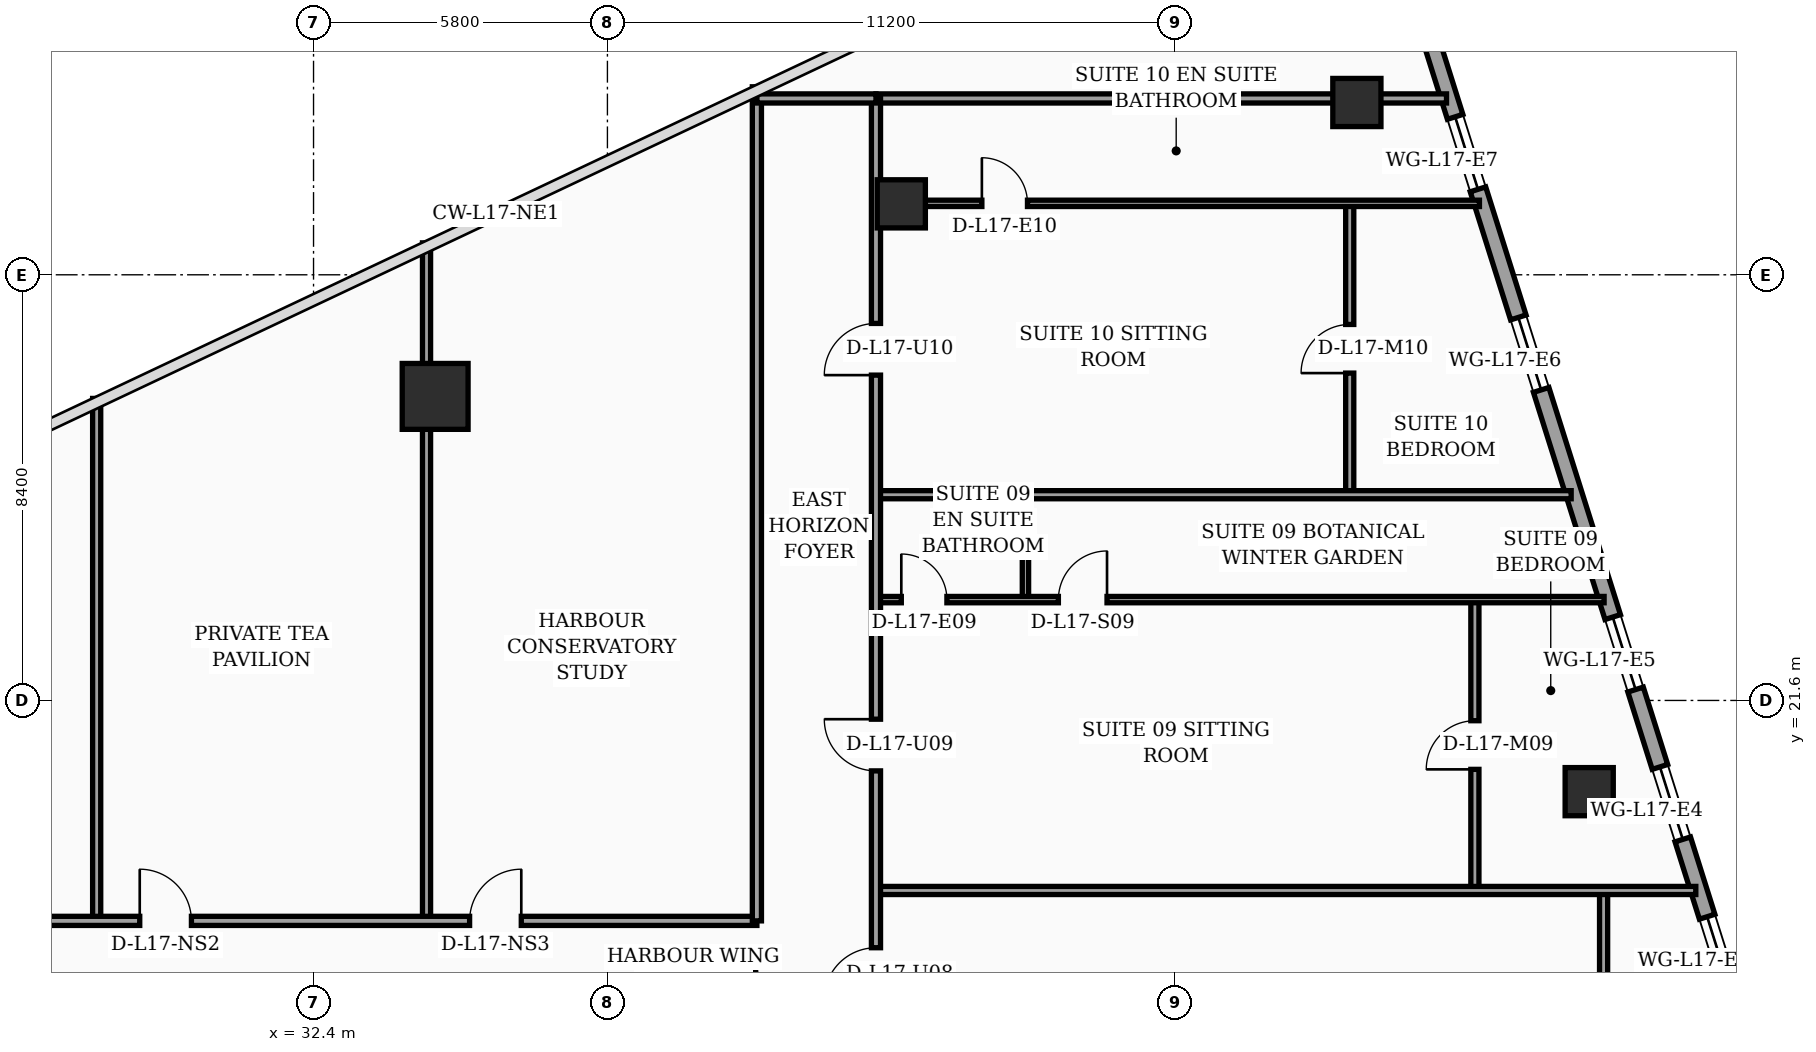
"""IFC4 building model, lengths in metres.
Left out: names, types, materials, properties, quantities, classifications, styles, units other than length and angle.
Written with IfcOpenShell. Run it as: python <this file> out.ifc"""

import sys

from ifc_helpers import new_model, si_unit, direction, frame, frame_2d, origin, origin_2d, place, context, subcontext, project, spatial, rectangle, hollow_rectangle, circle, extrude, element, fill, save


model = new_model("IFC4")
c1 = context("Model", 3, precision=1e-05, world=origin(), true_north=direction((0.0, 1.0)))
c2 = subcontext(c1, "Body", "Model", "MODEL_VIEW")
j1 = project(units=[si_unit("LENGTHUNIT", "METRE"), si_unit("PLANEANGLEUNIT", "RADIAN")], contexts=[c1])
p1 = place(None, origin())
s1 = spatial("IfcSite", under=j1, at=p1, CompositionType="ELEMENT")
p2 = place(p1, origin())
s2 = spatial("IfcBuilding", under=s1, at=p2, CompositionType="ELEMENT")
p3 = place(p2, frame((0.0, 0.0, 73.6)))
s3 = spatial("IfcBuildingStorey", under=s2, at=p3, CompositionType="ELEMENT", Elevation=73.6)
p4 = place(p3, frame((34.8, 27.6, 0.0), z_axis=(0.0, 0.0, 1.0), x_axis=(1.0, 0.0, 0.0)))
e1 = element("IfcColumn", 1, at=p4, inside=s3, PredefinedType="COLUMN", context=c2, shape_type="SweptSolid", body=[
    extrude(circle(Radius=0.65, at=origin_2d()), origin(), (0.0, 0.0, 1.0), 3.56),
])
for number, where, z_axis, x_axis in (
    (2, (44.0, 31.4, 0.0), (0.0, 0.0, 1.0), (1.0, 0.0, 0.0)),
    (3, (57.576, 19.8, 0.0), (0.0, 0.0, 1.0), (1.0, 0.0, 0.0)),
    (4, (52.991, 33.4, 0.0), (0.0, 0.0, 1.0), (1.0, 0.0, 0.0)),
):
    element("IfcColumn", number, at=place(p3, frame(where, z_axis=z_axis, x_axis=x_axis)), inside=s3, PredefinedType="COLUMN", context=c2, shape_type="SweptSolid", body=[
        extrude(hollow_rectangle(XDim=0.95, YDim=0.95, WallThickness=0.04, at=origin_2d()), origin(), (0.0, 0.0, 1.0), 3.56),
    ])
p5 = place(p3, frame((63.63, 5.505, 0.0), z_axis=(0.0, 0.0, 1.0), x_axis=(-0.300501856448, 0.953781229775, 0.0)))
e5 = element("IfcWall", 5, at=p5, inside=s3, PredefinedType="SOLIDWALL", context=c2, shape_type="SweptSolid", body=[
    extrude(rectangle(XDim=30.814, YDim=0.32, at=frame_2d((15.407, 0.0))), origin(), (0.0, 0.0, 1.0), 3.56),
])
p6 = place(p5, frame((4.747, 0.0, 0.0)))
e6 = element("IfcOpeningElement", 6, at=p6, cuts=e5, PredefinedType="OPENING", context=c2, shape_type="SweptSolid", body=[
    extrude(rectangle(XDim=1.4, YDim=2.25, at=frame_2d((0.7, 1.125))), frame((0.0, 0.17, 0.0), z_axis=(0.0, -1.0, 0.0), x_axis=(1.0, 0.0, 0.0)), (0.0, 0.0, 1.0), 0.34),
])
p7 = place(p5, frame((2.65, 0.0, 0.75)))
e7 = element("IfcOpeningElement", 7, at=p7, cuts=e5, PredefinedType="OPENING", context=c2, shape_type="SweptSolid", body=[
    extrude(rectangle(XDim=1.5, YDim=1.6, at=frame_2d((0.75, 0.8))), frame((0.0, 0.17, 0.0), z_axis=(0.0, -1.0, 0.0), x_axis=(1.0, 0.0, 0.0)), (0.0, 0.0, 1.0), 0.34),
])
p8 = place(p5, frame((7.8, 0.0, 0.75)))
e8 = element("IfcOpeningElement", 8, at=p8, cuts=e5, PredefinedType="OPENING", context=c2, shape_type="SweptSolid", body=[
    extrude(rectangle(XDim=1.5, YDim=1.6, at=frame_2d((0.75, 0.8))), frame((0.0, 0.17, 0.0), z_axis=(0.0, -1.0, 0.0), x_axis=(1.0, 0.0, 0.0)), (0.0, 0.0, 1.0), 0.34),
])
p9 = place(p5, frame((10.9, 0.0, 0.75)))
e9 = element("IfcOpeningElement", 9, at=p9, cuts=e5, PredefinedType="OPENING", context=c2, shape_type="SweptSolid", body=[
    extrude(rectangle(XDim=1.5, YDim=1.6, at=frame_2d((0.75, 0.8))), frame((0.0, 0.17, 0.0), z_axis=(0.0, -1.0, 0.0), x_axis=(1.0, 0.0, 0.0)), (0.0, 0.0, 1.0), 0.34),
])
p10 = place(p5, frame((14.0, 0.0, 0.75)))
e10 = element("IfcOpeningElement", 10, at=p10, cuts=e5, PredefinedType="OPENING", context=c2, shape_type="SweptSolid", body=[
    extrude(rectangle(XDim=1.5, YDim=1.6, at=frame_2d((0.75, 0.8))), frame((0.0, 0.17, 0.0), z_axis=(0.0, -1.0, 0.0), x_axis=(1.0, 0.0, 0.0)), (0.0, 0.0, 1.0), 0.34),
])
p11 = place(p5, frame((17.1, 0.0, 0.75)))
e11 = element("IfcOpeningElement", 11, at=p11, cuts=e5, PredefinedType="OPENING", context=c2, shape_type="SweptSolid", body=[
    extrude(rectangle(XDim=1.5, YDim=1.6, at=frame_2d((0.75, 0.8))), frame((0.0, 0.17, 0.0), z_axis=(0.0, -1.0, 0.0), x_axis=(1.0, 0.0, 0.0)), (0.0, 0.0, 1.0), 0.34),
])
p12 = place(p5, frame((23.3, 0.0, 0.75)))
e12 = element("IfcOpeningElement", 12, at=p12, cuts=e5, PredefinedType="OPENING", context=c2, shape_type="SweptSolid", body=[
    extrude(rectangle(XDim=1.5, YDim=1.6, at=frame_2d((0.75, 0.8))), frame((0.0, 0.17, 0.0), z_axis=(0.0, -1.0, 0.0), x_axis=(1.0, 0.0, 0.0)), (0.0, 0.0, 1.0), 0.34),
])
p13 = place(p5, frame((27.45, 0.0, 0.75)))
e13 = element("IfcOpeningElement", 13, at=p13, cuts=e5, PredefinedType="OPENING", context=c2, shape_type="SweptSolid", body=[
    extrude(rectangle(XDim=1.5, YDim=1.6, at=frame_2d((0.75, 0.8))), frame((0.0, 0.17, 0.0), z_axis=(0.0, -1.0, 0.0), x_axis=(1.0, 0.0, 0.0)), (0.0, 0.0, 1.0), 0.34),
])
p14 = place(p3, frame((28.12, 17.25, 0.0), z_axis=(0.0, 0.0, 1.0), x_axis=(0.0, 1.0, 0.0)))
e14 = element("IfcWall", 14, at=p14, inside=s3, PredefinedType="PARTITIONING", context=c2, shape_type="SweptSolid", body=[
    extrude(rectangle(XDim=10.31, YDim=0.16, at=frame_2d((5.155, 0.0))), origin(), (0.0, 0.0, 1.0), 2.84),
])
p15 = place(p3, frame((34.63, 17.25, 0.0), z_axis=(0.0, 0.0, 1.0), x_axis=(0.0, 1.0, 0.0)))
e15 = element("IfcWall", 15, at=p15, inside=s3, PredefinedType="PARTITIONING", context=c2, shape_type="SweptSolid", body=[
    extrude(rectangle(XDim=13.38, YDim=0.16, at=frame_2d((6.69, 0.0))), origin(), (0.0, 0.0, 1.0), 2.84),
])
p16 = place(p3, frame((21.5, 17.25, 0.0), z_axis=(0.0, 0.0, 1.0), x_axis=(1.0, 0.0, 0.0)))
e16 = element("IfcWall", 16, at=p16, inside=s3, PredefinedType="PARTITIONING", context=c2, shape_type="SweptSolid", body=[
    extrude(rectangle(XDim=19.65, YDim=0.18, at=frame_2d((9.825, 0.0))), origin(), (0.0, 0.0, 1.0), 2.84),
])
p17 = place(p16, frame((0.95, 0.0, 0.0)))
e17 = element("IfcOpeningElement", 17, at=p17, cuts=e16, PredefinedType="OPENING", context=c2, shape_type="SweptSolid", body=[
    extrude(rectangle(XDim=1.02, YDim=2.2, at=frame_2d((0.51, 1.1))), frame((0.0, 0.1, 0.0), z_axis=(0.0, -1.0, 0.0), x_axis=(1.0, 0.0, 0.0)), (0.0, 0.0, 1.0), 0.2),
])
p18 = place(p16, frame((7.47, 0.0, 0.0)))
e18 = element("IfcOpeningElement", 18, at=p18, cuts=e16, PredefinedType="OPENING", context=c2, shape_type="SweptSolid", body=[
    extrude(rectangle(XDim=1.02, YDim=2.2, at=frame_2d((0.51, 1.1))), frame((0.0, 0.1, 0.0), z_axis=(0.0, -1.0, 0.0), x_axis=(1.0, 0.0, 0.0)), (0.0, 0.0, 1.0), 0.2),
])
p19 = place(p16, frame((13.98, 0.0, 0.0)))
e19 = element("IfcOpeningElement", 19, at=p19, cuts=e16, PredefinedType="OPENING", context=c2, shape_type="SweptSolid", body=[
    extrude(rectangle(XDim=1.02, YDim=2.2, at=frame_2d((0.51, 1.1))), frame((0.0, 0.1, 0.0), z_axis=(0.0, -1.0, 0.0), x_axis=(1.0, 0.0, 0.0)), (0.0, 0.0, 1.0), 0.2),
])
p20 = place(p3, frame((41.15, 17.25, 0.0), z_axis=(0.0, 0.0, 1.0), x_axis=(0.0, 1.0, 0.0)))
e20 = element("IfcWall", 20, at=p20, inside=s3, PredefinedType="PARTITIONING", context=c2, shape_type="SweptSolid", body=[
    extrude(rectangle(XDim=16.46, YDim=0.18, at=frame_2d((8.23, 0.0))), origin(), (0.0, 0.0, 1.0), 2.84),
])
p21 = place(p3, frame((57.86, 7.45, 0.0), z_axis=(0.0, 0.0, 1.0), x_axis=(0.0, 1.0, 0.0)))
e21 = element("IfcWall", 21, at=p21, inside=s3, PredefinedType="PARTITIONING", context=c2, shape_type="SweptSolid", body=[
    extrude(rectangle(XDim=10.4, YDim=0.16, at=frame_2d((5.2, 0.0))), origin(), (0.0, 0.0, 1.0), 3.04),
])
p22 = place(p21, frame((4.72, 0.0, 0.0)))
e22 = element("IfcOpeningElement", 22, at=p22, cuts=e21, PredefinedType="OPENING", context=c2, shape_type="SweptSolid", body=[
    extrude(rectangle(XDim=0.96, YDim=2.2, at=frame_2d((0.48, 1.1))), frame((0.0, 0.09, 0.0), z_axis=(0.0, -1.0, 0.0), x_axis=(1.0, 0.0, 0.0)), (0.0, 0.0, 1.0), 0.18),
])
p23 = place(p3, frame((46.45, 23.59, 0.0), z_axis=(0.0, 0.0, 1.0), x_axis=(0.0, 1.0, 0.0)))
e23 = element("IfcWall", 23, at=p23, inside=s3, PredefinedType="PARTITIONING", context=c2, shape_type="SweptSolid", body=[
    extrude(rectangle(XDim=2.07, YDim=0.125, at=frame_2d((1.035, 0.0))), origin(), (0.0, 0.0, 1.0), 3.19),
])
p24 = place(p3, frame((55.32, 17.85, 0.0), z_axis=(0.0, 0.0, 1.0), x_axis=(0.0, 1.0, 0.0)))
e24 = element("IfcWall", 24, at=p24, inside=s3, PredefinedType="PARTITIONING", context=c2, shape_type="SweptSolid", body=[
    extrude(rectangle(XDim=5.74, YDim=0.16, at=frame_2d((2.87, 0.0))), origin(), (0.0, 0.0, 1.0), 2.84),
])
p25 = place(p24, frame((2.39, 0.0, 0.0)))
e25 = element("IfcOpeningElement", 25, at=p25, cuts=e24, PredefinedType="OPENING", context=c2, shape_type="SweptSolid", body=[
    extrude(rectangle(XDim=0.96, YDim=2.2, at=frame_2d((0.48, 1.1))), frame((0.0, 0.09, 0.0), z_axis=(0.0, -1.0, 0.0), x_axis=(1.0, 0.0, 0.0)), (0.0, 0.0, 1.0), 0.18),
])
p26 = place(p3, frame((43.5, 23.59, 0.0), z_axis=(0.0, 0.0, 1.0), x_axis=(1.0, 0.0, 0.0)))
e26 = element("IfcWall", 26, at=p26, inside=s3, PredefinedType="PARTITIONING", context=c2, shape_type="SweptSolid", body=[
    extrude(rectangle(XDim=14.37, YDim=0.125, at=frame_2d((7.185, 0.0))), origin(), (0.0, 0.0, 1.0), 2.84),
])
p27 = place(p26, frame((0.5, 0.0, 0.0)))
e27 = element("IfcOpeningElement", 27, at=p27, cuts=e26, PredefinedType="OPENING", context=c2, shape_type="SweptSolid", body=[
    extrude(rectangle(XDim=0.9, YDim=2.15, at=frame_2d((0.45, 1.075))), frame((0.0, 0.073, 0.0), z_axis=(0.0, -1.0, 0.0), x_axis=(1.0, 0.0, 0.0)), (0.0, 0.0, 1.0), 0.145),
])
p28 = place(p26, frame((3.6, 0.0, 0.0)))
e28 = element("IfcOpeningElement", 28, at=p28, cuts=e26, PredefinedType="OPENING", context=c2, shape_type="SweptSolid", body=[
    extrude(rectangle(XDim=0.96, YDim=2.2, at=frame_2d((0.48, 1.1))), frame((0.0, 0.073, 0.0), z_axis=(0.0, -1.0, 0.0), x_axis=(1.0, 0.0, 0.0)), (0.0, 0.0, 1.0), 0.145),
])
p29 = place(p3, frame((52.85, 25.66, 0.0), z_axis=(0.0, 0.0, 1.0), x_axis=(0.0, 1.0, 0.0)))
e29 = element("IfcWall", 29, at=p29, inside=s3, PredefinedType="PARTITIONING", context=c2, shape_type="SweptSolid", body=[
    extrude(rectangle(XDim=5.75, YDim=0.16, at=frame_2d((2.875, 0.0))), origin(), (0.0, 0.0, 1.0), 3.56),
])
p30 = place(p29, frame((2.4, 0.0, 0.0)))
e30 = element("IfcOpeningElement", 30, at=p30, cuts=e29, PredefinedType="OPENING", context=c2, shape_type="SweptSolid", body=[
    extrude(rectangle(XDim=0.96, YDim=2.2, at=frame_2d((0.48, 1.1))), frame((0.0, 0.09, 0.0), z_axis=(0.0, -1.0, 0.0), x_axis=(1.0, 0.0, 0.0)), (0.0, 0.0, 1.0), 0.18),
])
p31 = place(p3, frame((43.5, 31.41, 0.0), z_axis=(0.0, 0.0, 1.0), x_axis=(1.0, 0.0, 0.0)))
e31 = element("IfcWall", 31, at=p31, inside=s3, PredefinedType="PARTITIONING", context=c2, shape_type="SweptSolid", body=[
    extrude(rectangle(XDim=11.91, YDim=0.125, at=frame_2d((5.955, 0.0))), origin(), (0.0, 0.0, 1.0), 2.84),
])
p32 = place(p31, frame((2.09, 0.0, 0.0)))
e32 = element("IfcOpeningElement", 32, at=p32, cuts=e31, PredefinedType="OPENING", context=c2, shape_type="SweptSolid", body=[
    extrude(rectangle(XDim=0.9, YDim=2.15, at=frame_2d((0.45, 1.075))), frame((0.0, 0.073, 0.0), z_axis=(0.0, -1.0, 0.0), x_axis=(1.0, 0.0, 0.0)), (0.0, 0.0, 1.0), 0.145),
])
p33 = place(p3, frame((43.5, 25.66, 0.0), z_axis=(0.0, 0.0, 1.0), x_axis=(1.0, 0.0, 0.0)))
e33 = element("IfcWall", 33, at=p33, inside=s3, PredefinedType="PARTITIONING", context=c2, shape_type="SweptSolid", body=[
    extrude(rectangle(XDim=13.72, YDim=0.16, at=frame_2d((6.86, 0.0))), origin(), (0.0, 0.0, 1.0), 2.84),
])
p34 = place(p3, frame((43.5, 17.85, 0.0), z_axis=(0.0, 0.0, 1.0), x_axis=(1.0, 0.0, 0.0)))
e34 = element("IfcWall", 34, at=p34, inside=s3, PredefinedType="PARTITIONING", context=c2, shape_type="SweptSolid", body=[
    extrude(rectangle(XDim=16.18, YDim=0.16, at=frame_2d((8.09, 0.0))), origin(), (0.0, 0.0, 1.0), 2.84),
])
p35 = place(p3, frame((43.5, 33.48, 0.0), z_axis=(0.0, 0.0, 1.0), x_axis=(1.0, 0.0, 0.0)))
e35 = element("IfcWall", 35, at=p35, inside=s3, PredefinedType="PARTITIONING", context=c2, shape_type="SweptSolid", body=[
    extrude(rectangle(XDim=11.26, YDim=0.18, at=frame_2d((5.63, 0.0))), origin(), (0.0, 0.0, 1.0), 2.84),
])
p36 = place(p3, frame((43.5, 2.44, 0.0), z_axis=(0.0, 0.0, 1.0), x_axis=(0.0, 1.0, 0.0)))
e36 = element("IfcWall", 36, at=p36, inside=s3, PredefinedType="PARTITIONING", context=c2, shape_type="SweptSolid", body=[
    extrude(rectangle(XDim=31.04, YDim=0.18, at=frame_2d((15.52, 0.0))), origin(), (0.0, 0.0, 1.0), 2.84),
])
p37 = place(p36, frame((13.26, 0.0, 0.0)))
e37 = element("IfcOpeningElement", 37, at=p37, cuts=e36, PredefinedType="OPENING", context=c2, shape_type="SweptSolid", body=[
    extrude(rectangle(XDim=1.02, YDim=2.2, at=frame_2d((0.51, 1.1))), frame((0.0, 0.1, 0.0), z_axis=(0.0, -1.0, 0.0), x_axis=(1.0, 0.0, 0.0)), (0.0, 0.0, 1.0), 0.2),
])
p38 = place(p36, frame((17.77, 0.0, 0.0)))
e38 = element("IfcOpeningElement", 38, at=p38, cuts=e36, PredefinedType="OPENING", context=c2, shape_type="SweptSolid", body=[
    extrude(rectangle(XDim=1.02, YDim=2.2, at=frame_2d((0.51, 1.1))), frame((0.0, 0.1, 0.0), z_axis=(0.0, -1.0, 0.0), x_axis=(1.0, 0.0, 0.0)), (0.0, 0.0, 1.0), 0.2),
])
p39 = place(p36, frame((25.58, 0.0, 0.0)))
e39 = element("IfcOpeningElement", 39, at=p39, cuts=e36, PredefinedType="OPENING", context=c2, shape_type="SweptSolid", body=[
    extrude(rectangle(XDim=1.02, YDim=2.2, at=frame_2d((0.51, 1.1))), frame((0.0, 0.1, 0.0), z_axis=(0.0, -1.0, 0.0), x_axis=(1.0, 0.0, 0.0)), (0.0, 0.0, 1.0), 0.2),
])
p40 = place(p3, frame((41.15, 33.48, 0.0), z_axis=(0.0, 0.0, 1.0), x_axis=(1.0, 0.0, 0.0)))
e40 = element("IfcWall", 40, at=p40, inside=s3, PredefinedType="PARTITIONING", context=c2, shape_type="SweptSolid", body=[
    extrude(rectangle(XDim=2.35, YDim=0.18, at=frame_2d((1.175, 0.0))), origin(), (0.0, 0.0, 1.0), 3.56),
])
p41 = place(p9, origin())
e41 = element("IfcWindow", 41, at=p41, inside=s3, PartitioningType="SINGLE_PANEL", PredefinedType="WINDOW", context=c2, shape_type="SweptSolid", body=[
    extrude(rectangle(XDim=1.5, YDim=1.6, at=frame_2d((0.75, 0.8))), frame((0.0, 0.03, 0.0), z_axis=(0.0, -1.0, 0.0), x_axis=(1.0, 0.0, 0.0)), (0.0, 0.0, 1.0), 0.06),
])
fill(e9, e41)
p42 = place(p10, origin())
e42 = element("IfcWindow", 42, at=p42, inside=s3, PartitioningType="SINGLE_PANEL", PredefinedType="WINDOW", context=c2, shape_type="SweptSolid", body=[
    extrude(rectangle(XDim=1.5, YDim=1.6, at=frame_2d((0.75, 0.8))), frame((0.0, 0.03, 0.0), z_axis=(0.0, -1.0, 0.0), x_axis=(1.0, 0.0, 0.0)), (0.0, 0.0, 1.0), 0.06),
])
fill(e10, e42)
p43 = place(p11, origin())
e43 = element("IfcWindow", 43, at=p43, inside=s3, PartitioningType="SINGLE_PANEL", PredefinedType="WINDOW", context=c2, shape_type="SweptSolid", body=[
    extrude(rectangle(XDim=1.5, YDim=1.6, at=frame_2d((0.75, 0.8))), frame((0.0, 0.03, 0.0), z_axis=(0.0, -1.0, 0.0), x_axis=(1.0, 0.0, 0.0)), (0.0, 0.0, 1.0), 0.06),
])
fill(e11, e43)
p44 = place(p12, origin())
e44 = element("IfcWindow", 44, at=p44, inside=s3, PartitioningType="SINGLE_PANEL", PredefinedType="WINDOW", context=c2, shape_type="SweptSolid", body=[
    extrude(rectangle(XDim=1.5, YDim=1.6, at=frame_2d((0.75, 0.8))), frame((0.0, 0.03, 0.0), z_axis=(0.0, -1.0, 0.0), x_axis=(1.0, 0.0, 0.0)), (0.0, 0.0, 1.0), 0.06),
])
fill(e12, e44)
p45 = place(p13, origin())
e45 = element("IfcWindow", 45, at=p45, inside=s3, PartitioningType="SINGLE_PANEL", PredefinedType="WINDOW", context=c2, shape_type="SweptSolid", body=[
    extrude(rectangle(XDim=1.5, YDim=1.6, at=frame_2d((0.75, 0.8))), frame((0.0, 0.03, 0.0), z_axis=(0.0, -1.0, 0.0), x_axis=(1.0, 0.0, 0.0)), (0.0, 0.0, 1.0), 0.06),
])
fill(e13, e45)
p46 = place(p18, origin())
e46 = element("IfcDoor", 46, at=p46, inside=s3, OperationType="SINGLE_SWING_LEFT", PredefinedType="DOOR", context=c2, shape_type="SweptSolid", body=[
    extrude(rectangle(XDim=1.02, YDim=2.2, at=frame_2d((0.51, 1.1))), frame((0.0, 0.025, 0.0), z_axis=(0.0, -1.0, 0.0), x_axis=(1.0, 0.0, 0.0)), (0.0, 0.0, 1.0), 0.05),
])
fill(e18, e46)
p47 = place(p19, origin())
e47 = element("IfcDoor", 47, at=p47, inside=s3, OperationType="SINGLE_SWING_RIGHT", PredefinedType="DOOR", context=c2, shape_type="SweptSolid", body=[
    extrude(rectangle(XDim=1.02, YDim=2.2, at=frame_2d((0.51, 1.1))), frame((0.0, 0.025, 0.0), z_axis=(0.0, -1.0, 0.0), x_axis=(1.0, 0.0, 0.0)), (0.0, 0.0, 1.0), 0.05),
])
fill(e19, e47)
p48 = place(p25, origin())
e48 = element("IfcDoor", 48, at=p48, inside=s3, OperationType="SINGLE_SWING_LEFT", PredefinedType="DOOR", context=c2, shape_type="SweptSolid", body=[
    extrude(rectangle(XDim=0.96, YDim=2.2, at=frame_2d((0.48, 1.1))), frame((0.0, 0.025, 0.0), z_axis=(0.0, -1.0, 0.0), x_axis=(1.0, 0.0, 0.0)), (0.0, 0.0, 1.0), 0.05),
])
fill(e25, e48)
p49 = place(p27, origin())
e49 = element("IfcDoor", 49, at=p49, inside=s3, OperationType="SINGLE_SWING_LEFT", PredefinedType="DOOR", context=c2, shape_type="SweptSolid", body=[
    extrude(rectangle(XDim=0.9, YDim=2.15, at=frame_2d((0.45, 1.075))), frame((0.0, 0.025, 0.0), z_axis=(0.0, -1.0, 0.0), x_axis=(1.0, 0.0, 0.0)), (0.0, 0.0, 1.0), 0.05),
])
fill(e27, e49)
p50 = place(p28, origin())
e50 = element("IfcDoor", 50, at=p50, inside=s3, OperationType="SINGLE_SWING_RIGHT", PredefinedType="DOOR", context=c2, shape_type="SweptSolid", body=[
    extrude(rectangle(XDim=0.96, YDim=2.2, at=frame_2d((0.48, 1.1))), frame((0.0, 0.025, 0.0), z_axis=(0.0, -1.0, 0.0), x_axis=(1.0, 0.0, 0.0)), (0.0, 0.0, 1.0), 0.05),
])
fill(e28, e50)
p51 = place(p30, origin())
e51 = element("IfcDoor", 51, at=p51, inside=s3, OperationType="SINGLE_SWING_LEFT", PredefinedType="DOOR", context=c2, shape_type="SweptSolid", body=[
    extrude(rectangle(XDim=0.96, YDim=2.2, at=frame_2d((0.48, 1.1))), frame((0.0, 0.025, 0.0), z_axis=(0.0, -1.0, 0.0), x_axis=(1.0, 0.0, 0.0)), (0.0, 0.0, 1.0), 0.05),
])
fill(e30, e51)
p52 = place(p32, origin())
e52 = element("IfcDoor", 52, at=p52, inside=s3, OperationType="SINGLE_SWING_LEFT", PredefinedType="DOOR", context=c2, shape_type="SweptSolid", body=[
    extrude(rectangle(XDim=0.9, YDim=2.15, at=frame_2d((0.45, 1.075))), frame((0.0, 0.025, 0.0), z_axis=(0.0, -1.0, 0.0), x_axis=(1.0, 0.0, 0.0)), (0.0, 0.0, 1.0), 0.05),
])
fill(e32, e52)
p53 = place(p37, origin())
e53 = element("IfcDoor", 53, at=p53, inside=s3, OperationType="SINGLE_SWING_LEFT", PredefinedType="DOOR", context=c2, shape_type="SweptSolid", body=[
    extrude(rectangle(XDim=1.02, YDim=2.2, at=frame_2d((0.51, 1.1))), frame((0.0, 0.025, 0.0), z_axis=(0.0, -1.0, 0.0), x_axis=(1.0, 0.0, 0.0)), (0.0, 0.0, 1.0), 0.05),
])
fill(e37, e53)
p54 = place(p38, origin())
e54 = element("IfcDoor", 54, at=p54, inside=s3, OperationType="SINGLE_SWING_RIGHT", PredefinedType="DOOR", context=c2, shape_type="SweptSolid", body=[
    extrude(rectangle(XDim=1.02, YDim=2.2, at=frame_2d((0.51, 1.1))), frame((0.0, 0.025, 0.0), z_axis=(0.0, -1.0, 0.0), x_axis=(1.0, 0.0, 0.0)), (0.0, 0.0, 1.0), 0.05),
])
fill(e38, e54)
p55 = place(p39, origin())
e55 = element("IfcDoor", 55, at=p55, inside=s3, OperationType="SINGLE_SWING_LEFT", PredefinedType="DOOR", context=c2, shape_type="SweptSolid", body=[
    extrude(rectangle(XDim=1.02, YDim=2.2, at=frame_2d((0.51, 1.1))), frame((0.0, 0.025, 0.0), z_axis=(0.0, -1.0, 0.0), x_axis=(1.0, 0.0, 0.0)), (0.0, 0.0, 1.0), 0.05),
])
fill(e39, e55)
save(model, sys.argv[1])
